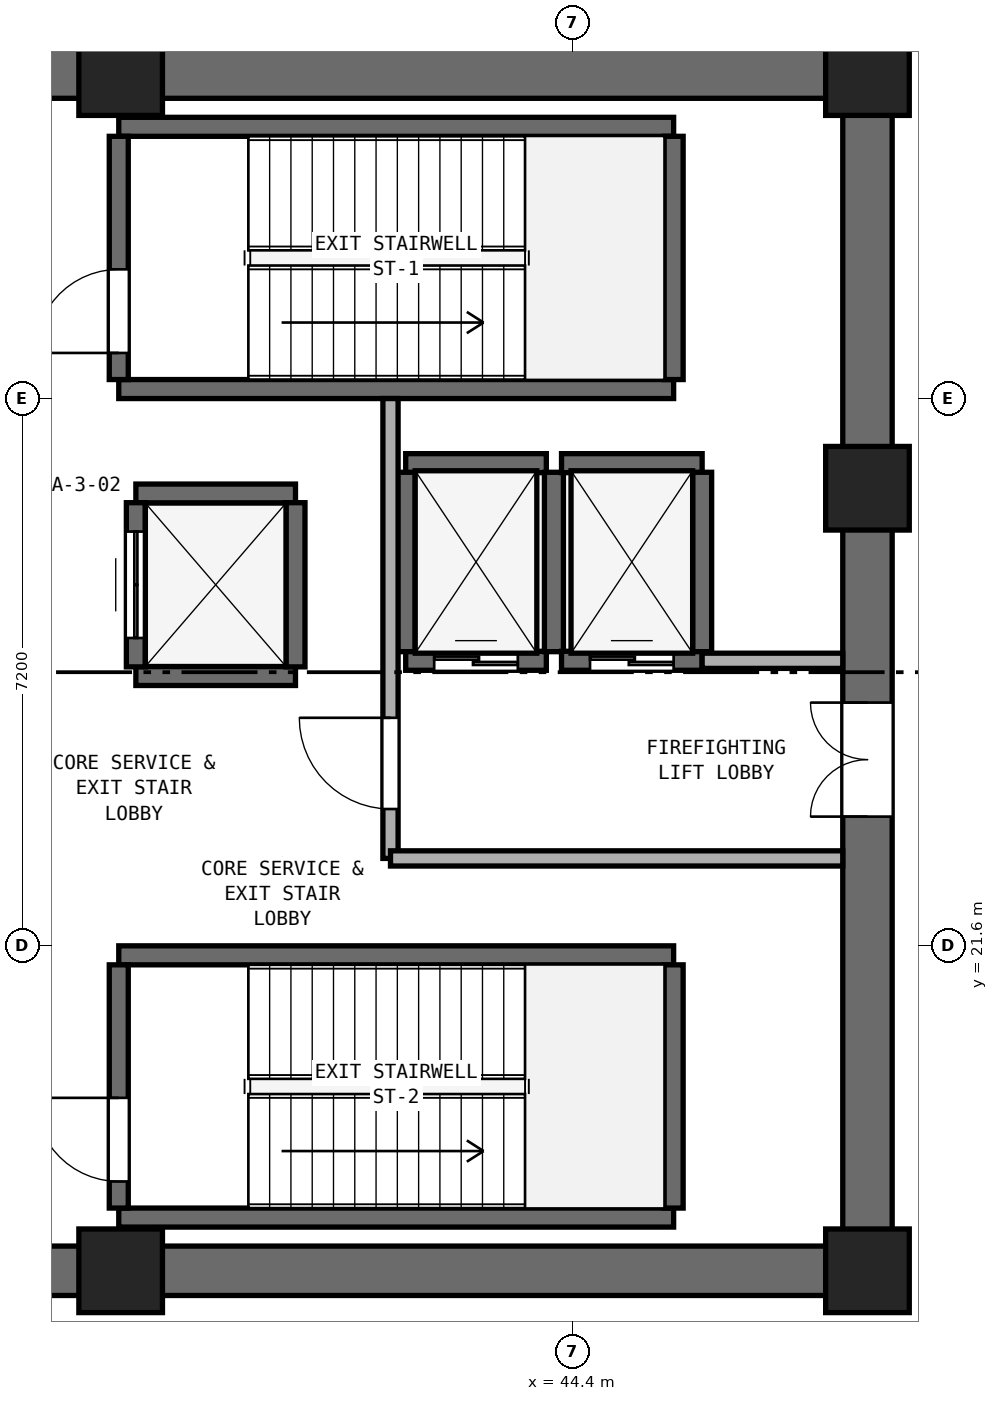
"""IFC4 building model, lengths in metres.
Left out: names, types, materials, properties, quantities, classifications, styles, units other than length and angle.
Written with IfcOpenShell. Run it as: python <this file> out.ifc"""

import sys

from ifc_helpers import new_model, si_unit, direction, frame, frame_2d, origin, origin_2d, place, context, subcontext, project, spatial, rectangle, extrude, element, fill, save


model = new_model("IFC4")
c1 = context("Model", 3, precision=1e-05, world=origin(), true_north=direction((0.0, 1.0)))
c2 = subcontext(c1, "Body", "Model", "MODEL_VIEW")
j1 = project(units=[si_unit("LENGTHUNIT", "METRE"), si_unit("PLANEANGLEUNIT", "RADIAN")], contexts=[c1])
p1 = place(None, origin())
s1 = spatial("IfcSite", under=j1, at=p1, CompositionType="ELEMENT")
p2 = place(p1, origin())
s2 = spatial("IfcBuilding", under=s1, at=p2, CompositionType="ELEMENT")
p3 = place(p2, frame((0.0, 0.0, 20.0)))
s3 = spatial("IfcBuildingStorey", under=s2, at=p3, CompositionType="ELEMENT", Elevation=20.0)
for number, where, z_axis, x_axis in (
    (1, (25.4, 17.325, 0.0), (0.0, 0.0, 1.0), (1.0, 0.0, 0.0)),
    (2, (25.4, 33.075, 0.0), (0.0, 0.0, 1.0), (1.0, 0.0, 0.0)),
):
    element("IfcWall", number, at=place(p3, frame(where, z_axis=z_axis, x_axis=x_axis)), inside=s3, PredefinedType="SHEAR", context=c2, shape_type="SweptSolid", body=[
        extrude(rectangle(XDim=23.2, YDim=0.65, at=frame_2d((11.6, 0.0))), origin(), (0.0, 0.0, 1.0), 4.6),
    ])
p4 = place(p3, frame((48.275, 17.65, 0.0), z_axis=(0.0, 0.0, 1.0), x_axis=(0.0, 1.0, 0.0)))
e3 = element("IfcWall", 3, at=p4, inside=s3, PredefinedType="SHEAR", context=c2, shape_type="SweptSolid", body=[
    extrude(rectangle(XDim=15.1, YDim=0.65, at=frame_2d((7.55, 0.0))), origin(), (0.0, 0.0, 1.0), 4.6),
])
p5 = place(p4, frame((5.65, 0.0, 0.0)))
e4 = element("IfcOpeningElement", 4, at=p5, cuts=e3, PredefinedType="OPENING", context=c2, shape_type="SweptSolid", body=[
    extrude(rectangle(XDim=1.5, YDim=2.15, at=frame_2d((0.75, 1.075))), frame((0.0, 0.335, 0.0), z_axis=(0.0, -1.0, 0.0), x_axis=(1.0, 0.0, 0.0)), (0.0, 0.0, 1.0), 0.67),
])
for number, where, z_axis, x_axis in (
    (5, (38.45, 17.325, 0.0), (0.0, 0.0, 1.0), (1.0, 0.0, 0.0)),
    (6, (48.275, 17.325, 0.0), (0.0, 0.0, 1.0), (1.0, 0.0, 0.0)),
    (7, (48.275, 27.62, 0.0), (0.0, 0.0, 1.0), (1.0, 0.0, 0.0)),
    (8, (48.275, 33.075, 0.0), (0.0, 0.0, 1.0), (1.0, 0.0, 0.0)),
    (9, (38.45, 33.075, 0.0), (0.0, 0.0, 1.0), (1.0, 0.0, 0.0)),
):
    element("IfcColumn", number, at=place(p3, frame(where, z_axis=z_axis, x_axis=x_axis)), inside=s3, PredefinedType="PILASTER", context=c2, shape_type="SweptSolid", body=[
        extrude(rectangle(XDim=1.1, YDim=1.1, at=origin_2d()), origin(), (0.0, 0.0, 1.0), 5.0),
    ])
for number, where, z_axis, x_axis in (
    (10, (38.425, 28.925, 0.0), (0.0, 0.0, 1.0), (1.0, 0.0, 0.0)),
    (11, (38.425, 32.375, 0.0), (0.0, 0.0, 1.0), (1.0, 0.0, 0.0)),
):
    element("IfcWall", number, at=place(p3, frame(where, z_axis=z_axis, x_axis=x_axis)), inside=s3, PredefinedType="SHEAR", context=c2, shape_type="SweptSolid", body=[
        extrude(rectangle(XDim=7.3, YDim=0.25, at=frame_2d((3.65, 0.0))), origin(), (0.0, 0.0, 1.0), 4.6),
    ])
p6 = place(p3, frame((38.425, 29.05, 0.0), z_axis=(0.0, 0.0, 1.0), x_axis=(0.0, 1.0, 0.0)))
e12 = element("IfcWall", 12, at=p6, inside=s3, PredefinedType="SHEAR", context=c2, shape_type="SweptSolid", body=[
    extrude(rectangle(XDim=3.2, YDim=0.25, at=frame_2d((1.6, 0.0))), origin(), (0.0, 0.0, 1.0), 4.6),
])
p7 = place(p6, frame((0.35, 0.0, 0.0)))
e13 = element("IfcOpeningElement", 13, at=p7, cuts=e12, PredefinedType="OPENING", context=c2, shape_type="SweptSolid", body=[
    extrude(rectangle(XDim=1.1, YDim=2.15, at=frame_2d((0.55, 1.075))), frame((0.0, 0.135, 0.0), z_axis=(0.0, -1.0, 0.0), x_axis=(1.0, 0.0, 0.0)), (0.0, 0.0, 1.0), 0.27),
])
p8 = place(p3, frame((45.725, 29.05, 0.0), z_axis=(0.0, 0.0, 1.0), x_axis=(0.0, 1.0, 0.0)))
e14 = element("IfcWall", 14, at=p8, inside=s3, PredefinedType="SHEAR", context=c2, shape_type="SweptSolid", body=[
    extrude(rectangle(XDim=3.2, YDim=0.25, at=frame_2d((1.6, 0.0))), origin(), (0.0, 0.0, 1.0), 4.6),
])
for number, where, z_axis, x_axis in (
    (15, (38.425, 18.025, 0.0), (0.0, 0.0, 1.0), (1.0, 0.0, 0.0)),
    (16, (38.425, 21.475, 0.0), (0.0, 0.0, 1.0), (1.0, 0.0, 0.0)),
):
    element("IfcWall", number, at=place(p3, frame(where, z_axis=z_axis, x_axis=x_axis)), inside=s3, PredefinedType="SHEAR", context=c2, shape_type="SweptSolid", body=[
        extrude(rectangle(XDim=7.3, YDim=0.25, at=frame_2d((3.65, 0.0))), origin(), (0.0, 0.0, 1.0), 4.6),
    ])
p9 = place(p3, frame((38.425, 18.15, 0.0), z_axis=(0.0, 0.0, 1.0), x_axis=(0.0, 1.0, 0.0)))
e17 = element("IfcWall", 17, at=p9, inside=s3, PredefinedType="SHEAR", context=c2, shape_type="SweptSolid", body=[
    extrude(rectangle(XDim=3.2, YDim=0.25, at=frame_2d((1.6, 0.0))), origin(), (0.0, 0.0, 1.0), 4.6),
])
p10 = place(p9, frame((0.35, 0.0, 0.0)))
e18 = element("IfcOpeningElement", 18, at=p10, cuts=e17, PredefinedType="OPENING", context=c2, shape_type="SweptSolid", body=[
    extrude(rectangle(XDim=1.1, YDim=2.15, at=frame_2d((0.55, 1.075))), frame((0.0, 0.135, 0.0), z_axis=(0.0, -1.0, 0.0), x_axis=(1.0, 0.0, 0.0)), (0.0, 0.0, 1.0), 0.27),
])
p11 = place(p3, frame((45.725, 18.15, 0.0), z_axis=(0.0, 0.0, 1.0), x_axis=(0.0, 1.0, 0.0)))
e19 = element("IfcWall", 19, at=p11, inside=s3, PredefinedType="SHEAR", context=c2, shape_type="SweptSolid", body=[
    extrude(rectangle(XDim=3.2, YDim=0.25, at=frame_2d((1.6, 0.0))), origin(), (0.0, 0.0, 1.0), 4.6),
])
p12 = place(p3, frame((42.2, 25.35, 0.0), z_axis=(0.0, 0.0, 1.0), x_axis=(1.0, 0.0, 0.0)))
e20 = element("IfcWall", 20, at=p12, inside=s3, PredefinedType="SHEAR", context=c2, shape_type="SweptSolid", body=[
    extrude(rectangle(XDim=1.85, YDim=0.25, at=frame_2d((0.925, 0.0))), origin(), (0.0, 0.0, 1.0), 4.6),
])
p13 = place(p12, frame((0.375, 0.0, 0.0)))
e21 = element("IfcOpeningElement", 21, at=p13, cuts=e20, PredefinedType="OPENING", context=c2, shape_type="SweptSolid", body=[
    extrude(rectangle(XDim=1.1, YDim=2.15, at=frame_2d((0.55, 1.075))), frame((0.0, 0.135, 0.0), z_axis=(0.0, -1.0, 0.0), x_axis=(1.0, 0.0, 0.0)), (0.0, 0.0, 1.0), 0.27),
])
p14 = place(p3, frame((42.2, 27.95, 0.0), z_axis=(0.0, 0.0, 1.0), x_axis=(1.0, 0.0, 0.0)))
e22 = element("IfcWall", 22, at=p14, inside=s3, PredefinedType="SHEAR", context=c2, shape_type="SweptSolid", body=[
    extrude(rectangle(XDim=1.85, YDim=0.25, at=frame_2d((0.925, 0.0))), origin(), (0.0, 0.0, 1.0), 4.6),
])
for number, where, z_axis, x_axis in (
    (23, (42.2, 25.47, 0.0), (0.0, 0.0, 1.0), (0.0, 1.0, 0.0)),
    (24, (44.15, 25.47, 0.0), (0.0, 0.0, 1.0), (0.0, 1.0, 0.0)),
):
    element("IfcWall", number, at=place(p3, frame(where, z_axis=z_axis, x_axis=x_axis)), inside=s3, PredefinedType="SHEAR", context=c2, shape_type="SweptSolid", body=[
        extrude(rectangle(XDim=2.36, YDim=0.25, at=frame_2d((1.18, 0.0))), origin(), (0.0, 0.0, 1.0), 4.6),
    ])
p15 = place(p3, frame((44.25, 25.35, 0.0), z_axis=(0.0, 0.0, 1.0), x_axis=(1.0, 0.0, 0.0)))
e25 = element("IfcWall", 25, at=p15, inside=s3, PredefinedType="SHEAR", context=c2, shape_type="SweptSolid", body=[
    extrude(rectangle(XDim=1.85, YDim=0.25, at=frame_2d((0.925, 0.0))), origin(), (0.0, 0.0, 1.0), 4.6),
])
p16 = place(p15, frame((0.375, 0.0, 0.0)))
e26 = element("IfcOpeningElement", 26, at=p16, cuts=e25, PredefinedType="OPENING", context=c2, shape_type="SweptSolid", body=[
    extrude(rectangle(XDim=1.1, YDim=2.15, at=frame_2d((0.55, 1.075))), frame((0.0, 0.135, 0.0), z_axis=(0.0, -1.0, 0.0), x_axis=(1.0, 0.0, 0.0)), (0.0, 0.0, 1.0), 0.27),
])
p17 = place(p3, frame((44.25, 27.95, 0.0), z_axis=(0.0, 0.0, 1.0), x_axis=(1.0, 0.0, 0.0)))
e27 = element("IfcWall", 27, at=p17, inside=s3, PredefinedType="SHEAR", context=c2, shape_type="SweptSolid", body=[
    extrude(rectangle(XDim=1.85, YDim=0.25, at=frame_2d((0.925, 0.0))), origin(), (0.0, 0.0, 1.0), 4.6),
])
p18 = place(p3, frame((46.1, 25.47, 0.0), z_axis=(0.0, 0.0, 1.0), x_axis=(0.0, 1.0, 0.0)))
e28 = element("IfcWall", 28, at=p18, inside=s3, PredefinedType="SHEAR", context=c2, shape_type="SweptSolid", body=[
    extrude(rectangle(XDim=2.36, YDim=0.25, at=frame_2d((1.18, 0.0))), origin(), (0.0, 0.0, 1.0), 4.6),
])
for number, where, z_axis, x_axis in (
    (29, (38.65, 25.15, 0.0), (0.0, 0.0, 1.0), (1.0, 0.0, 0.0)),
    (30, (38.65, 27.55, 0.0), (0.0, 0.0, 1.0), (1.0, 0.0, 0.0)),
):
    element("IfcWall", number, at=place(p3, frame(where, z_axis=z_axis, x_axis=x_axis)), inside=s3, PredefinedType="SHEAR", context=c2, shape_type="SweptSolid", body=[
        extrude(rectangle(XDim=2.1, YDim=0.25, at=frame_2d((1.05, 0.0))), origin(), (0.0, 0.0, 1.0), 4.6),
    ])
p19 = place(p3, frame((38.65, 25.27, 0.0), z_axis=(0.0, 0.0, 1.0), x_axis=(0.0, 1.0, 0.0)))
e31 = element("IfcWall", 31, at=p19, inside=s3, PredefinedType="SHEAR", context=c2, shape_type="SweptSolid", body=[
    extrude(rectangle(XDim=2.16, YDim=0.25, at=frame_2d((1.08, 0.0))), origin(), (0.0, 0.0, 1.0), 4.6),
])
p20 = place(p19, frame((0.38, 0.0, 0.0)))
e32 = element("IfcOpeningElement", 32, at=p20, cuts=e31, PredefinedType="OPENING", context=c2, shape_type="SweptSolid", body=[
    extrude(rectangle(XDim=1.4, YDim=2.2, at=frame_2d((0.7, 1.1))), frame((0.0, 0.135, 0.0), z_axis=(0.0, -1.0, 0.0), x_axis=(1.0, 0.0, 0.0)), (0.0, 0.0, 1.0), 0.27),
])
p21 = place(p3, frame((40.75, 25.27, 0.0), z_axis=(0.0, 0.0, 1.0), x_axis=(0.0, 1.0, 0.0)))
e33 = element("IfcWall", 33, at=p21, inside=s3, PredefinedType="SHEAR", context=c2, shape_type="SweptSolid", body=[
    extrude(rectangle(XDim=2.16, YDim=0.25, at=frame_2d((1.08, 0.0))), origin(), (0.0, 0.0, 1.0), 4.6),
])
p22 = place(p3, frame((42.0, 22.75, 0.0), z_axis=(0.0, 0.0, 1.0), x_axis=(0.0, 1.0, 0.0)))
e34 = element("IfcWall", 34, at=p22, inside=s3, PredefinedType="SOLIDWALL", context=c2, shape_type="SweptSolid", body=[
    extrude(rectangle(XDim=6.05, YDim=0.2, at=frame_2d((3.025, 0.0))), origin(), (0.0, 0.0, 1.0), 4.6),
])
p23 = place(p22, frame((0.65, 0.0, 0.0)))
e35 = element("IfcOpeningElement", 35, at=p23, cuts=e34, PredefinedType="OPENING", context=c2, shape_type="SweptSolid", body=[
    extrude(rectangle(XDim=1.2, YDim=2.15, at=frame_2d((0.6, 1.075))), frame((0.0, 0.11, 0.0), z_axis=(0.0, -1.0, 0.0), x_axis=(1.0, 0.0, 0.0)), (0.0, 0.0, 1.0), 0.22),
])
p24 = place(p3, frame((42.0, 22.75, 0.0), z_axis=(0.0, 0.0, 1.0), x_axis=(1.0, 0.0, 0.0)))
e36 = element("IfcWall", 36, at=p24, inside=s3, PredefinedType="SOLIDWALL", context=c2, shape_type="SweptSolid", body=[
    extrude(rectangle(XDim=5.95, YDim=0.2, at=frame_2d((2.975, 0.0))), origin(), (0.0, 0.0, 1.0), 4.6),
])
p25 = place(p3, frame((46.1, 25.35, 0.0), z_axis=(0.0, 0.0, 1.0), x_axis=(1.0, 0.0, 0.0)))
e37 = element("IfcWall", 37, at=p25, inside=s3, PredefinedType="SOLIDWALL", context=c2, shape_type="SweptSolid", body=[
    extrude(rectangle(XDim=1.85, YDim=0.2, at=frame_2d((0.925, 0.0))), origin(), (0.0, 0.0, 1.0), 4.6),
])
p26 = place(p7, origin())
e38 = element("IfcDoor", 38, at=p26, inside=s3, OperationType="SINGLE_SWING_LEFT", PredefinedType="DOOR", context=c2, shape_type="SweptSolid", body=[
    extrude(rectangle(XDim=1.1, YDim=2.15, at=frame_2d((0.55, 1.075))), frame((0.0, 0.025, 0.0), z_axis=(0.0, -1.0, 0.0), x_axis=(1.0, 0.0, 0.0)), (0.0, 0.0, 1.0), 0.05),
])
fill(e13, e38)
p27 = place(p10, origin())
e39 = element("IfcDoor", 39, at=p27, inside=s3, OperationType="SINGLE_SWING_RIGHT", PredefinedType="DOOR", context=c2, shape_type="SweptSolid", body=[
    extrude(rectangle(XDim=1.1, YDim=2.15, at=frame_2d((0.55, 1.075))), frame((0.0, 0.025, 0.0), z_axis=(0.0, -1.0, 0.0), x_axis=(1.0, 0.0, 0.0)), (0.0, 0.0, 1.0), 0.05),
])
fill(e18, e39)
p28 = place(p13, origin())
e40 = element("IfcDoor", 40, at=p28, inside=s3, OperationType="DOUBLE_DOOR_SLIDING", PredefinedType="DOOR", context=c2, shape_type="SweptSolid", body=[
    extrude(rectangle(XDim=1.1, YDim=2.15, at=frame_2d((0.55, 1.075))), frame((0.0, 0.025, 0.0), z_axis=(0.0, -1.0, 0.0), x_axis=(1.0, 0.0, 0.0)), (0.0, 0.0, 1.0), 0.05),
])
fill(e21, e40)
p29 = place(p16, origin())
e41 = element("IfcDoor", 41, at=p29, inside=s3, OperationType="DOUBLE_DOOR_SLIDING", PredefinedType="DOOR", context=c2, shape_type="SweptSolid", body=[
    extrude(rectangle(XDim=1.1, YDim=2.15, at=frame_2d((0.55, 1.075))), frame((0.0, 0.025, 0.0), z_axis=(0.0, -1.0, 0.0), x_axis=(1.0, 0.0, 0.0)), (0.0, 0.0, 1.0), 0.05),
])
fill(e26, e41)
p30 = place(p20, origin())
e42 = element("IfcDoor", 42, at=p30, inside=s3, OperationType="DOUBLE_DOOR_SLIDING", PredefinedType="DOOR", context=c2, shape_type="SweptSolid", body=[
    extrude(rectangle(XDim=1.4, YDim=2.2, at=frame_2d((0.7, 1.1))), frame((0.0, 0.025, 0.0), z_axis=(0.0, -1.0, 0.0), x_axis=(1.0, 0.0, 0.0)), (0.0, 0.0, 1.0), 0.05),
])
fill(e32, e42)
p31 = place(p23, origin())
e43 = element("IfcDoor", 43, at=p31, inside=s3, OperationType="SINGLE_SWING_RIGHT", PredefinedType="DOOR", context=c2, shape_type="SweptSolid", body=[
    extrude(rectangle(XDim=1.2, YDim=2.15, at=frame_2d((0.6, 1.075))), frame((0.0, 0.025, 0.0), z_axis=(0.0, -1.0, 0.0), x_axis=(1.0, 0.0, 0.0)), (0.0, 0.0, 1.0), 0.05),
])
fill(e35, e43)
p32 = place(p5, origin())
e44 = element("IfcDoor", 44, at=p32, inside=s3, OperationType="DOUBLE_DOOR_SINGLE_SWING", PredefinedType="DOOR", context=c2, shape_type="SweptSolid", body=[
    extrude(rectangle(XDim=1.5, YDim=2.15, at=frame_2d((0.75, 1.075))), frame((0.0, 0.025, 0.0), z_axis=(0.0, -1.0, 0.0), x_axis=(1.0, 0.0, 0.0)), (0.0, 0.0, 1.0), 0.05),
])
fill(e4, e44)
save(model, sys.argv[1])
